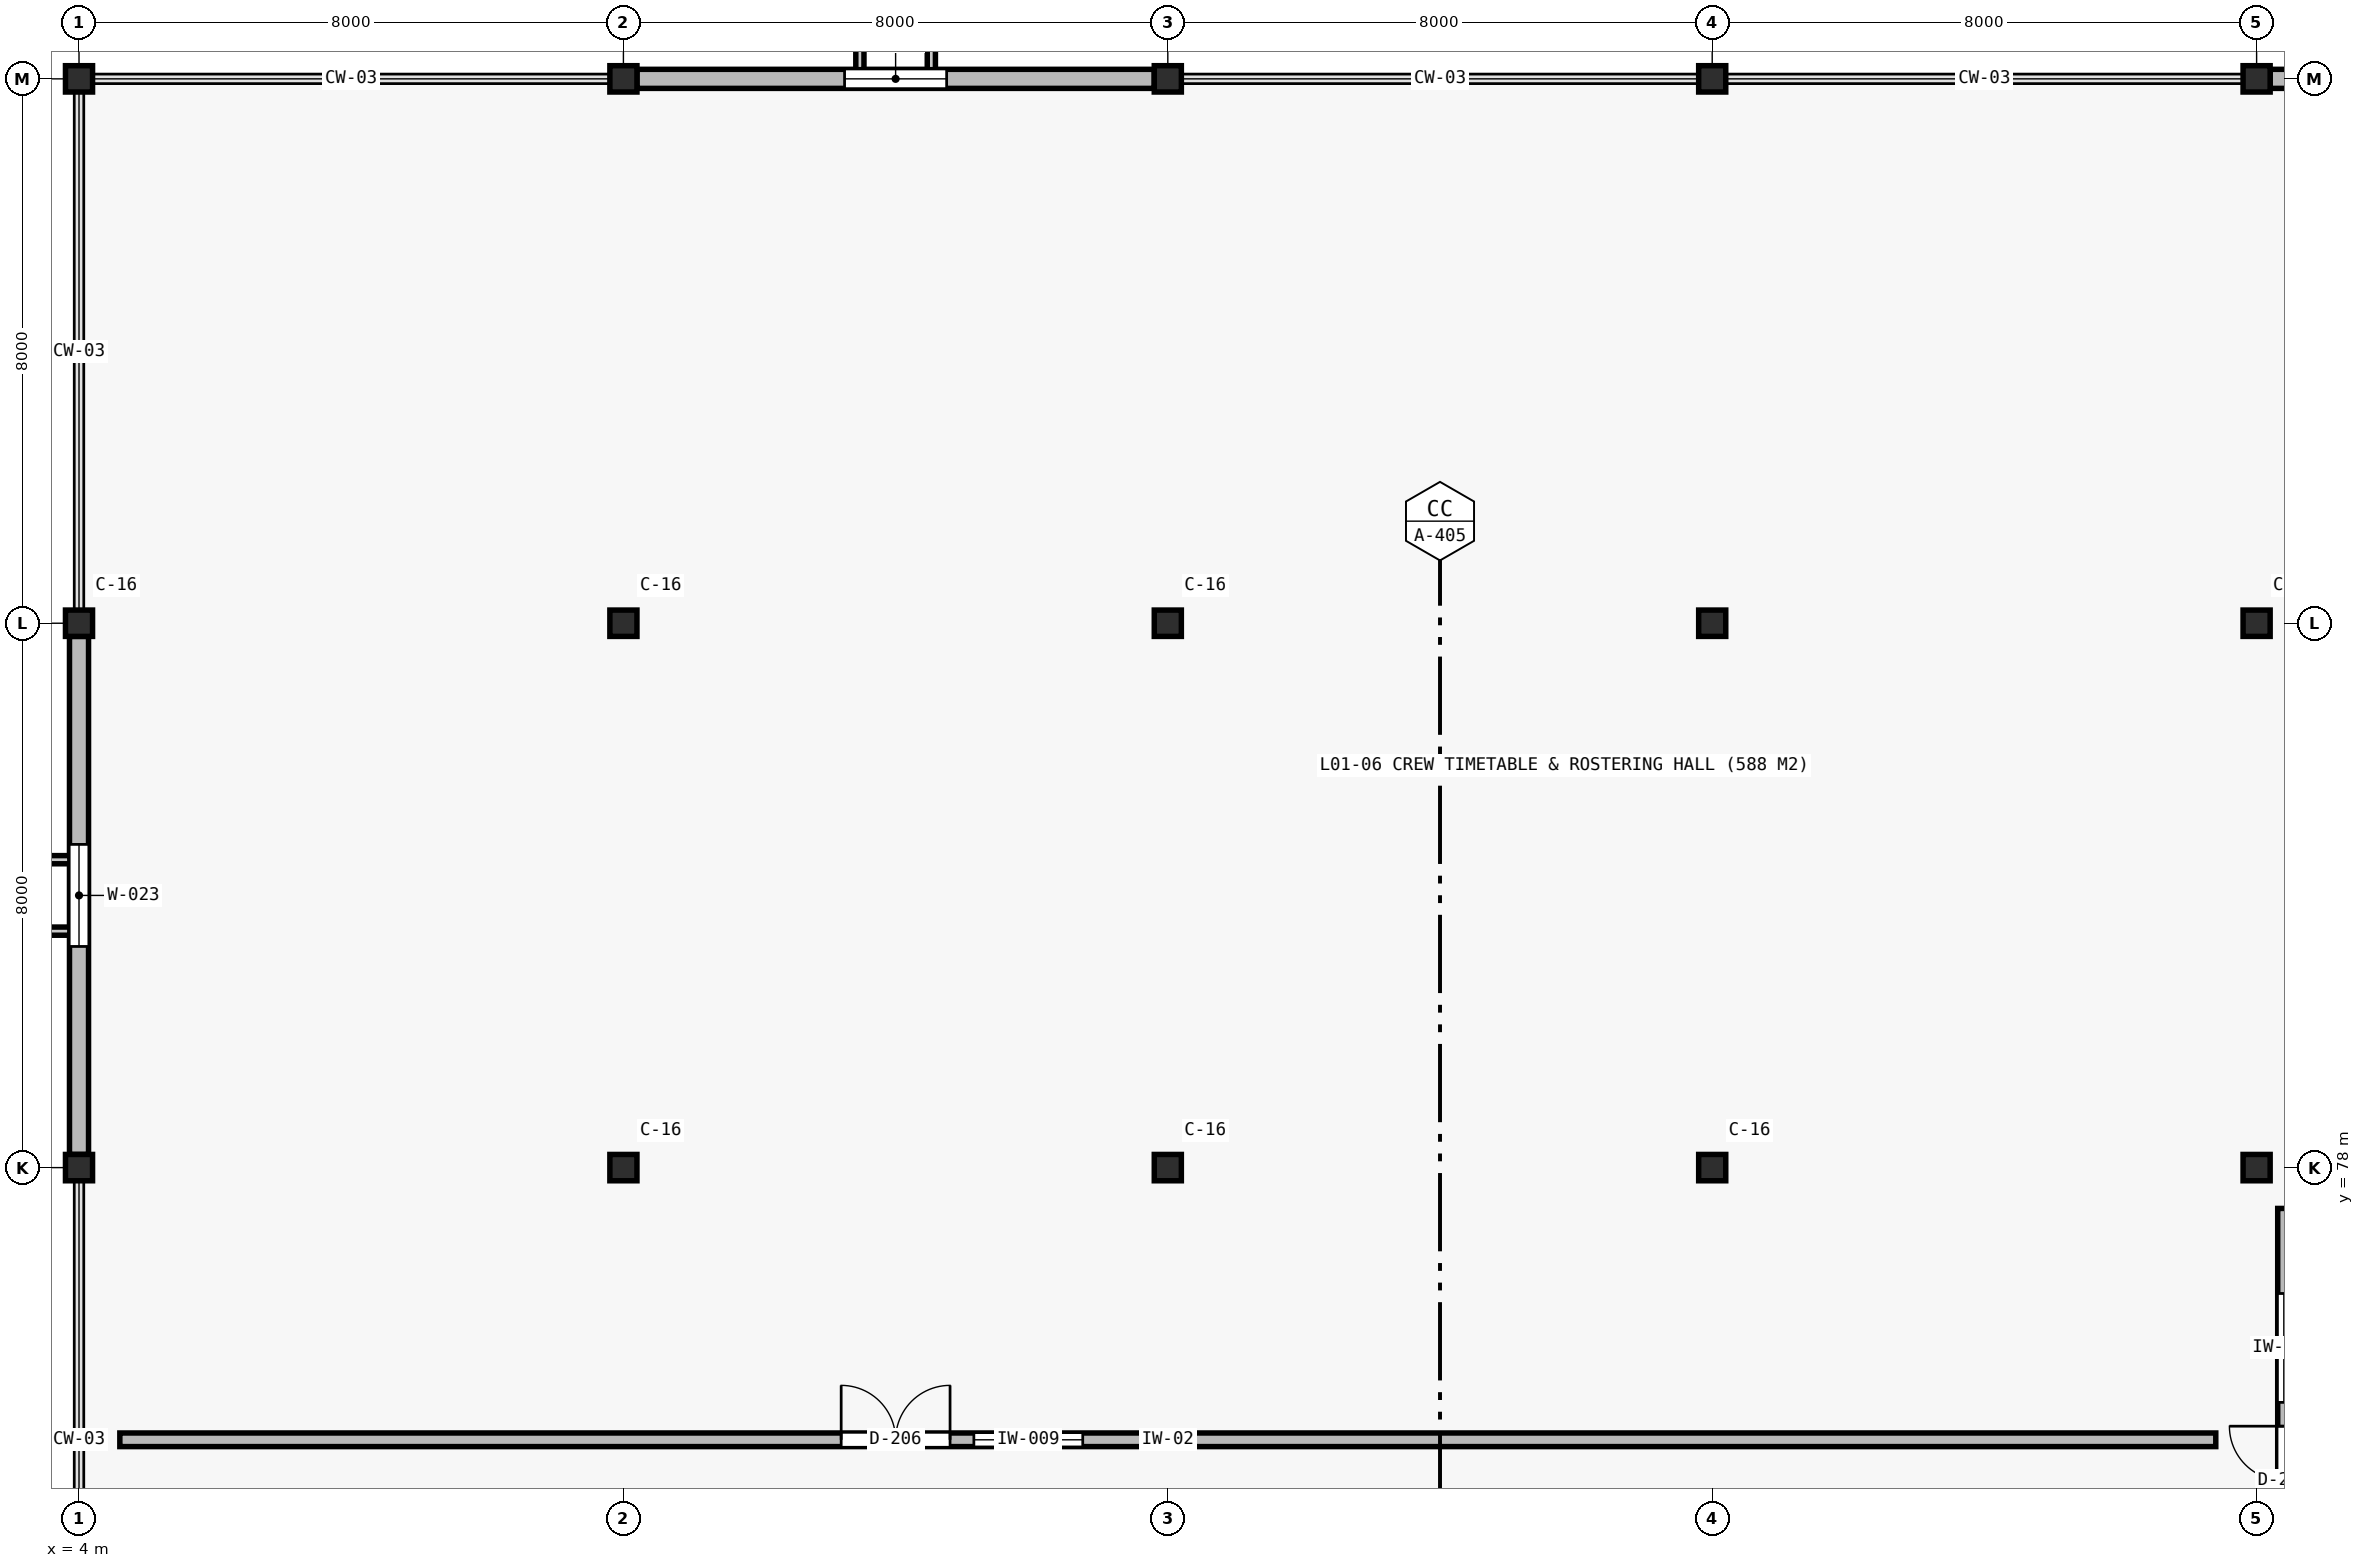
"""IFC4 building model, lengths in metres.
Left out: names, types, materials, properties, quantities, classifications, styles, units other than length and angle.
Written with IfcOpenShell. Run it as: python <this file> out.ifc"""

import sys

from ifc_helpers import new_model, si_unit, direction, frame, frame_2d, origin, origin_2d, place, context, subcontext, project, spatial, rectangle, i_section, extrude, element, fill, save


model = new_model("IFC4")
c1 = context("Model", 3, precision=1e-05, world=origin(), true_north=direction((0.0, 1.0)))
c2 = subcontext(c1, "Body", "Model", "MODEL_VIEW")
j1 = project(units=[si_unit("LENGTHUNIT", "METRE"), si_unit("PLANEANGLEUNIT", "RADIAN")], contexts=[c1])
p1 = place(None, origin())
s1 = spatial("IfcSite", under=j1, at=p1, CompositionType="ELEMENT")
p2 = place(p1, origin())
s2 = spatial("IfcBuilding", under=s1, at=p2, CompositionType="ELEMENT")
p3 = place(p2, frame((0.0, 0.0, 6.3)))
s3 = spatial("IfcBuildingStorey", under=s2, at=p3, CompositionType="ELEMENT", Elevation=6.3)
for number, where, z_axis, x_axis in (
    (1, (4.0, 78.0, 0.0), (0.0, 0.0, 1.0), (1.0, 0.0, 0.0)),
    (2, (4.0, 86.0, 0.0), (0.0, 0.0, 1.0), (1.0, 0.0, 0.0)),
    (3, (4.0, 94.0, 0.0), (0.0, 0.0, 1.0), (1.0, 0.0, 0.0)),
    (4, (12.0, 78.0, 0.0), (0.0, 0.0, 1.0), (1.0, 0.0, 0.0)),
    (5, (12.0, 86.0, 0.0), (0.0, 0.0, 1.0), (1.0, 0.0, 0.0)),
    (6, (12.0, 94.0, 0.0), (0.0, 0.0, 1.0), (1.0, 0.0, 0.0)),
    (7, (20.0, 78.0, 0.0), (0.0, 0.0, 1.0), (1.0, 0.0, 0.0)),
    (8, (20.0, 86.0, 0.0), (0.0, 0.0, 1.0), (1.0, 0.0, 0.0)),
    (9, (20.0, 94.0, 0.0), (0.0, 0.0, 1.0), (1.0, 0.0, 0.0)),
    (10, (28.0, 78.0, 0.0), (0.0, 0.0, 1.0), (1.0, 0.0, 0.0)),
    (11, (28.0, 86.0, 0.0), (0.0, 0.0, 1.0), (1.0, 0.0, 0.0)),
    (12, (28.0, 94.0, 0.0), (0.0, 0.0, 1.0), (1.0, 0.0, 0.0)),
    (13, (36.0, 78.0, 0.0), (0.0, 0.0, 1.0), (1.0, 0.0, 0.0)),
    (14, (36.0, 86.0, 0.0), (0.0, 0.0, 1.0), (1.0, 0.0, 0.0)),
    (15, (36.0, 94.0, 0.0), (0.0, 0.0, 1.0), (1.0, 0.0, 0.0)),
):
    element("IfcColumn", number, at=place(p3, frame(where, z_axis=z_axis, x_axis=x_axis)), inside=s3, PredefinedType="COLUMN", context=c2, shape_type="SweptSolid", body=[
        extrude(i_section(OverallWidth=0.398, OverallDepth=0.387, WebThickness=0.021, FlangeThickness=0.033, at=origin_2d()), origin(), (0.0, 0.0, 1.0), 4.6),
    ])
p4 = place(p3, frame((4.0, 78.194, 0.0), z_axis=(0.0, 0.0, 1.0), x_axis=(0.0, 1.0, 0.0)))
e16 = element("IfcWall", 16, at=p4, inside=s3, PredefinedType="STANDARD", context=c2, shape_type="SweptSolid", body=[
    extrude(rectangle(XDim=7.613, YDim=0.28, at=frame_2d((3.806, 0.0))), origin(), (0.0, 0.0, 1.0), 3.85),
])
p5 = place(p4, frame((3.056, 0.0, 0.95)))
e17 = element("IfcOpeningElement", 17, at=p5, cuts=e16, PredefinedType="OPENING", context=c2, shape_type="SweptSolid", body=[
    extrude(rectangle(XDim=1.5, YDim=2.0, at=frame_2d((0.75, 1.0))), frame((0.0, 0.15, 0.0), z_axis=(0.0, -1.0, 0.0), x_axis=(1.0, 0.0, 0.0)), (0.0, 0.0, 1.0), 0.3),
])
p6 = place(p3, frame((12.199, 94.0, 0.0), z_axis=(0.0, 0.0, 1.0), x_axis=(1.0, 0.0, 0.0)))
e18 = element("IfcWall", 18, at=p6, inside=s3, PredefinedType="STANDARD", context=c2, shape_type="SweptSolid", body=[
    extrude(rectangle(XDim=7.602, YDim=0.28, at=frame_2d((3.801, 0.0))), origin(), (0.0, 0.0, 1.0), 3.85),
])
p7 = place(p6, frame((3.051, 0.0, 0.95)))
e19 = element("IfcOpeningElement", 19, at=p7, cuts=e18, PredefinedType="OPENING", context=c2, shape_type="SweptSolid", body=[
    extrude(rectangle(XDim=1.5, YDim=2.0, at=frame_2d((0.75, 1.0))), frame((0.0, 0.15, 0.0), z_axis=(0.0, -1.0, 0.0), x_axis=(1.0, 0.0, 0.0)), (0.0, 0.0, 1.0), 0.3),
])
p8 = place(p3, frame((36.199, 94.0, 0.0), z_axis=(0.0, 0.0, 1.0), x_axis=(1.0, 0.0, 0.0)))
e20 = element("IfcWall", 20, at=p8, inside=s3, PredefinedType="STANDARD", context=c2, shape_type="SweptSolid", body=[
    extrude(rectangle(XDim=7.602, YDim=0.28, at=frame_2d((3.801, 0.0))), origin(), (0.0, 0.0, 1.0), 3.85),
])
p9 = place(p8, frame((3.051, 0.0, 0.95)))
e21 = element("IfcOpeningElement", 21, at=p9, cuts=e20, PredefinedType="OPENING", context=c2, shape_type="SweptSolid", body=[
    extrude(rectangle(XDim=1.5, YDim=2.0, at=frame_2d((0.75, 1.0))), frame((0.0, 0.15, 0.0), z_axis=(0.0, -1.0, 0.0), x_axis=(1.0, 0.0, 0.0)), (0.0, 0.0, 1.0), 0.3),
])
p10 = place(p3, frame((4.6, 74.0, 0.0), z_axis=(0.0, 0.0, 1.0), x_axis=(1.0, 0.0, 0.0)))
e22 = element("IfcWall", 22, at=p10, inside=s3, PredefinedType="PARTITIONING", context=c2, shape_type="SweptSolid", body=[
    extrude(rectangle(XDim=30.8, YDim=0.2, at=frame_2d((15.4, 0.0))), origin(), (0.0, 0.0, 1.0), 4.6),
])
p11 = place(p10, frame((10.6, 0.0, 0.0)))
e23 = element("IfcOpeningElement", 23, at=p11, cuts=e22, PredefinedType="OPENING", context=c2, shape_type="SweptSolid", body=[
    extrude(rectangle(XDim=1.6, YDim=2.2, at=frame_2d((0.8, 1.1))), frame((0.0, 0.11, 0.0), z_axis=(0.0, -1.0, 0.0), x_axis=(1.0, 0.0, 0.0)), (0.0, 0.0, 1.0), 0.22),
])
p12 = place(p10, frame((12.55, 0.0, 0.95)))
e24 = element("IfcOpeningElement", 24, at=p12, cuts=e22, PredefinedType="OPENING", context=c2, shape_type="SweptSolid", body=[
    extrude(rectangle(XDim=1.6, YDim=1.3, at=frame_2d((0.8, 0.65))), frame((0.0, 0.11, 0.0), z_axis=(0.0, -1.0, 0.0), x_axis=(1.0, 0.0, 0.0)), (0.0, 0.0, 1.0), 0.22),
])
p13 = place(p3, frame((36.4, 70.2, 0.0), z_axis=(0.0, 0.0, 1.0), x_axis=(0.0, 1.0, 0.0)))
e25 = element("IfcWall", 25, at=p13, inside=s3, PredefinedType="PARTITIONING", context=c2, shape_type="SweptSolid", body=[
    extrude(rectangle(XDim=7.2, YDim=0.18, at=frame_2d((3.6, 0.0))), origin(), (0.0, 0.0, 1.0), 4.6),
])
p14 = place(p13, frame((2.4, 0.0, 0.0)))
e26 = element("IfcOpeningElement", 26, at=p14, cuts=e25, PredefinedType="OPENING", context=c2, shape_type="SweptSolid", body=[
    extrude(rectangle(XDim=1.6, YDim=2.2, at=frame_2d((0.8, 1.1))), frame((0.0, 0.1, 0.0), z_axis=(0.0, -1.0, 0.0), x_axis=(1.0, 0.0, 0.0)), (0.0, 0.0, 1.0), 0.2),
])
p15 = place(p13, frame((4.35, 0.0, 0.95)))
e27 = element("IfcOpeningElement", 27, at=p15, cuts=e25, PredefinedType="OPENING", context=c2, shape_type="SweptSolid", body=[
    extrude(rectangle(XDim=1.6, YDim=1.3, at=frame_2d((0.8, 0.65))), frame((0.0, 0.1, 0.0), z_axis=(0.0, -1.0, 0.0), x_axis=(1.0, 0.0, 0.0)), (0.0, 0.0, 1.0), 0.2),
])
p16 = place(p5, origin())
e28 = element("IfcWindow", 28, at=p16, inside=s3, PartitioningType="SINGLE_PANEL", PredefinedType="WINDOW", context=c2, shape_type="SweptSolid", body=[
    extrude(rectangle(XDim=1.5, YDim=2.0, at=frame_2d((0.75, 1.0))), frame((0.0, 0.03, 0.0), z_axis=(0.0, -1.0, 0.0), x_axis=(1.0, 0.0, 0.0)), (0.0, 0.0, 1.0), 0.06),
])
fill(e17, e28)
p17 = place(p7, origin())
e29 = element("IfcWindow", 29, at=p17, inside=s3, PartitioningType="SINGLE_PANEL", PredefinedType="WINDOW", context=c2, shape_type="SweptSolid", body=[
    extrude(rectangle(XDim=1.5, YDim=2.0, at=frame_2d((0.75, 1.0))), frame((0.0, 0.03, 0.0), z_axis=(0.0, -1.0, 0.0), x_axis=(1.0, 0.0, 0.0)), (0.0, 0.0, 1.0), 0.06),
])
fill(e19, e29)
p18 = place(p11, origin())
e30 = element("IfcDoor", 30, at=p18, inside=s3, OperationType="DOUBLE_DOOR_SINGLE_SWING", PredefinedType="DOOR", context=c2, shape_type="SweptSolid", body=[
    extrude(rectangle(XDim=1.6, YDim=2.2, at=frame_2d((0.8, 1.1))), frame((0.0, 0.025, 0.0), z_axis=(0.0, -1.0, 0.0), x_axis=(1.0, 0.0, 0.0)), (0.0, 0.0, 1.0), 0.05),
])
fill(e23, e30)
p19 = place(p12, origin())
e31 = element("IfcWindow", 31, at=p19, inside=s3, PartitioningType="SINGLE_PANEL", PredefinedType="WINDOW", context=c2, shape_type="SweptSolid", body=[
    extrude(rectangle(XDim=1.6, YDim=1.3, at=frame_2d((0.8, 0.65))), frame((0.0, 0.03, 0.0), z_axis=(0.0, -1.0, 0.0), x_axis=(1.0, 0.0, 0.0)), (0.0, 0.0, 1.0), 0.06),
])
fill(e24, e31)
p20 = place(p14, origin())
e32 = element("IfcDoor", 32, at=p20, inside=s3, OperationType="DOUBLE_DOOR_SINGLE_SWING", PredefinedType="DOOR", context=c2, shape_type="SweptSolid", body=[
    extrude(rectangle(XDim=1.6, YDim=2.2, at=frame_2d((0.8, 1.1))), frame((0.0, 0.025, 0.0), z_axis=(0.0, -1.0, 0.0), x_axis=(1.0, 0.0, 0.0)), (0.0, 0.0, 1.0), 0.05),
])
fill(e26, e32)
p21 = place(p15, origin())
e33 = element("IfcWindow", 33, at=p21, inside=s3, PartitioningType="SINGLE_PANEL", PredefinedType="WINDOW", context=c2, shape_type="SweptSolid", body=[
    extrude(rectangle(XDim=1.6, YDim=1.3, at=frame_2d((0.8, 0.65))), frame((0.0, 0.03, 0.0), z_axis=(0.0, -1.0, 0.0), x_axis=(1.0, 0.0, 0.0)), (0.0, 0.0, 1.0), 0.06),
])
fill(e27, e33)
save(model, sys.argv[1])
